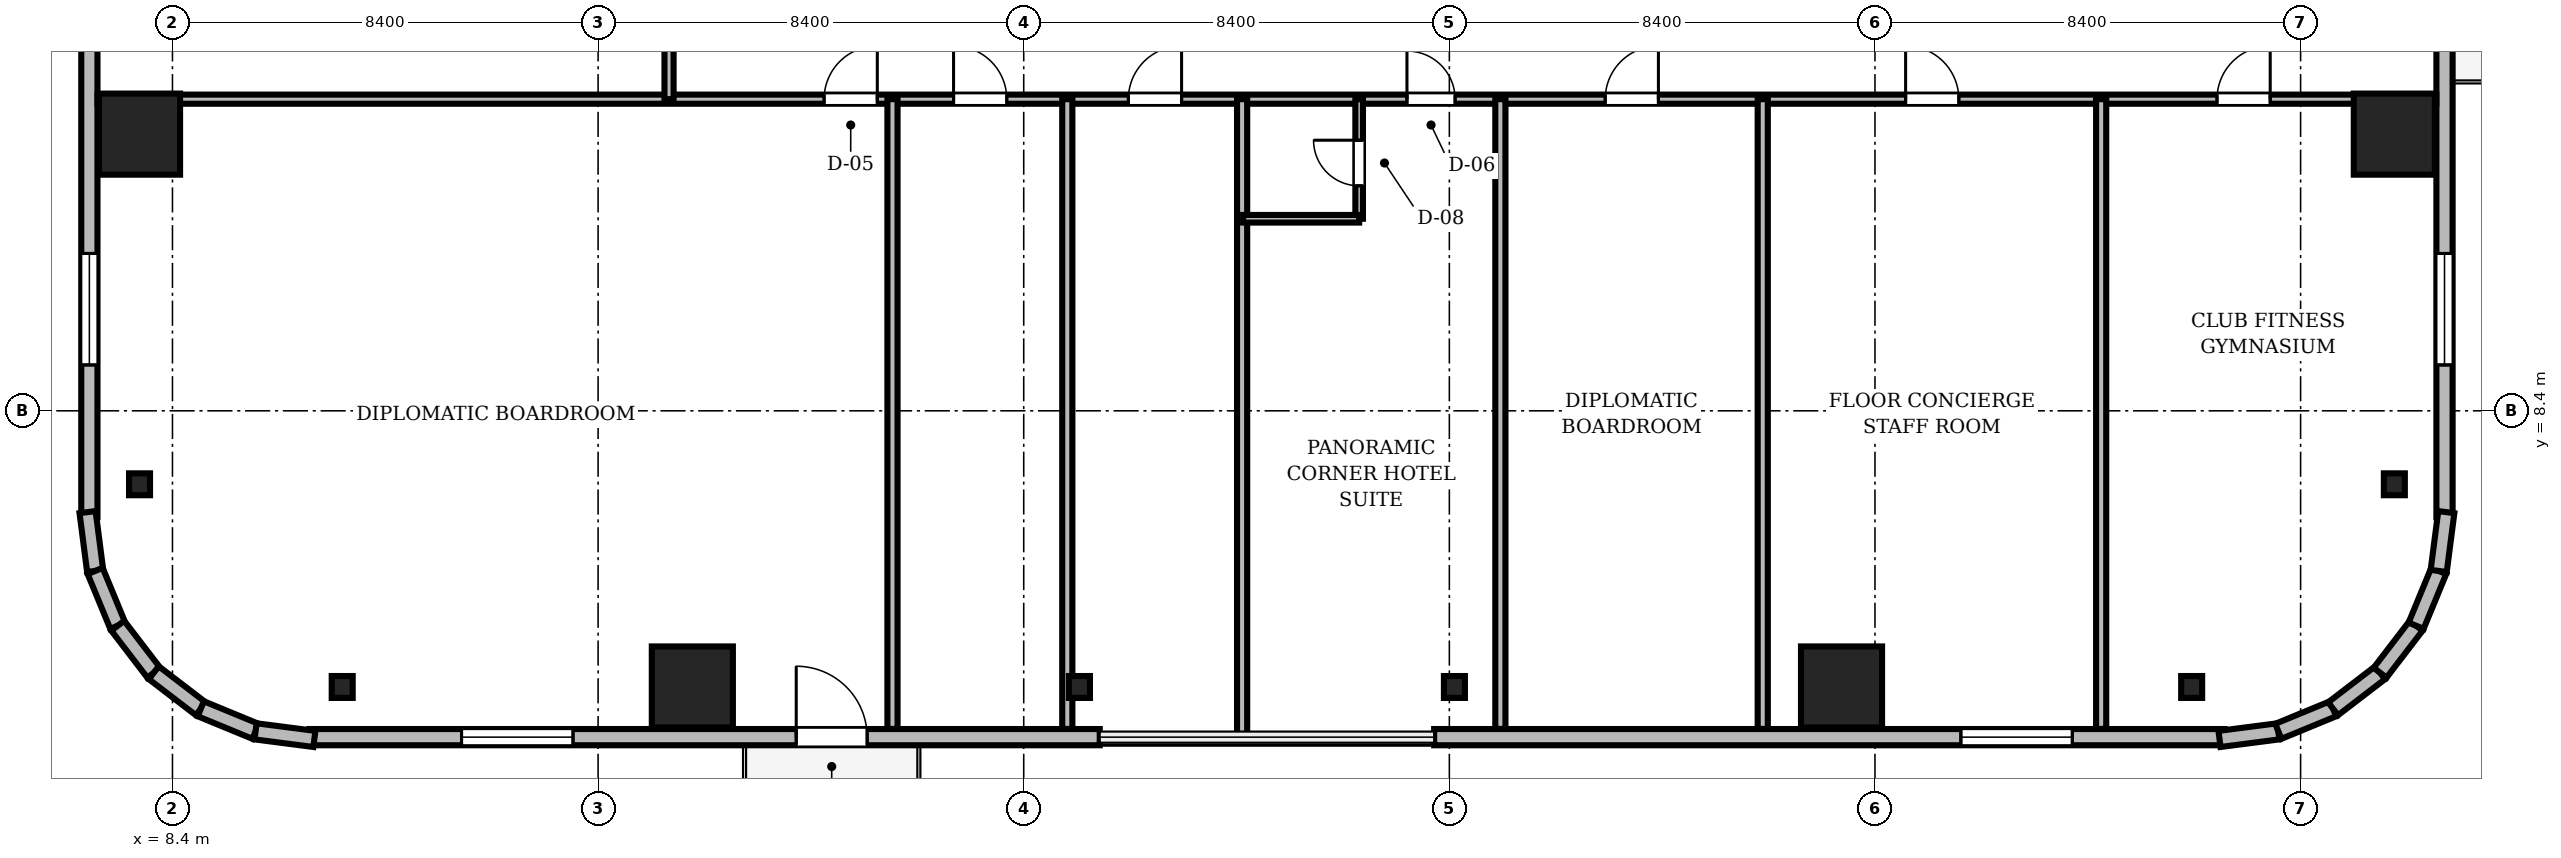
"""IFC4 building model, lengths in metres.
Left out: names, types, materials, properties, quantities, classifications, styles, units other than length and angle.
Written with IfcOpenShell. Run it as: python <this file> out.ifc"""

import sys

from ifc_helpers import new_model, si_unit, direction, frame, frame_2d, origin, origin_2d, place, context, subcontext, project, spatial, rectangle, i_section, extrude, source, transform, mapped, element, fill, save


model = new_model("IFC4")
c1 = context("Model", 3, precision=1e-05, world=origin(), true_north=direction((0.0, 1.0)))
c2 = subcontext(c1, "Body", "Model", "MODEL_VIEW")
j1 = project(units=[si_unit("LENGTHUNIT", "METRE"), si_unit("PLANEANGLEUNIT", "RADIAN")], contexts=[c1])
p1 = place(None, origin())
s1 = spatial("IfcSite", under=j1, at=p1, CompositionType="ELEMENT")
p2 = place(p1, origin())
s2 = spatial("IfcBuilding", under=s1, at=p2, CompositionType="ELEMENT")
p3 = place(p2, frame((0.0, 0.0, 107.5)))
s3 = spatial("IfcBuildingStorey", under=s2, at=p3, CompositionType="ELEMENT", Elevation=107.5)
m1 = source(origin(), c2, "Body", "SweptSolid", [
    extrude(rectangle(XDim=1.6, YDim=1.6, at=origin_2d()), origin(), (0.0, 0.0, 1.0), 3.56),
])
for number, where, z_axis, x_axis in (
    (1, (18.66, 2.95, 0.0), (0.0, 0.0, 1.0), (1.0, 0.0, 0.0)),
    (2, (41.34, 2.95, 0.0), (0.0, 0.0, 1.0), (1.0, 0.0, 0.0)),
    (3, (52.25, 13.86, 0.0), (0.0, 0.0, 1.0), (1.0, 0.0, 0.0)),
    (4, (7.75, 13.86, 0.0), (0.0, 0.0, 1.0), (1.0, 0.0, 0.0)),
):
    element("IfcColumn", number, at=place(p3, frame(where, z_axis=z_axis, x_axis=x_axis)), inside=s3, PredefinedType="COLUMN", context=c2, shape_type="MappedRepresentation", body=[
        mapped(m1, transform((0.0, 0.0, 0.0), scale=1.0)),
    ])
m2 = source(origin(), c2, "Body", "SweptSolid", [
    extrude(i_section(OverallWidth=0.414, OverallDepth=0.432, WebThickness=0.026, FlangeThickness=0.04, FilletRadius=0.015, at=origin_2d()), origin(), (0.0, 0.0, 1.0), 3.56),
])
for number, where, z_axis, x_axis in (
    (5, (11.75, 2.95, 0.0), (0.0, 0.0, 1.0), (1.0, 0.0, 0.0)),
    (6, (26.3, 2.95, 0.0), (0.0, 0.0, 1.0), (1.0, 0.0, 0.0)),
    (7, (33.7, 2.95, 0.0), (0.0, 0.0, 1.0), (1.0, 0.0, 0.0)),
    (8, (48.25, 2.95, 0.0), (0.0, 0.0, 1.0), (1.0, 0.0, 0.0)),
    (9, (52.25, 6.95, 0.0), (0.0, 0.0, 1.0), (1.0, 0.0, 0.0)),
    (10, (7.75, 6.95, 0.0), (0.0, 0.0, 1.0), (1.0, 0.0, 0.0)),
):
    element("IfcColumn", number, at=place(p3, frame(where, z_axis=z_axis, x_axis=x_axis)), inside=s3, PredefinedType="COLUMN", context=c2, shape_type="MappedRepresentation", body=[
        mapped(m2, transform((0.0, 0.0, 0.0), scale=1.0)),
    ])
m3 = source(origin(), c2, "Body", "SweptSolid", [
    extrude(rectangle(XDim=15.6, YDim=0.32, at=frame_2d((7.8, 0.0))), origin(), (0.0, 0.0, 1.0), 3.56),
])
p4 = place(p3, frame((11.1, 1.96, 0.0), z_axis=(0.0, 0.0, 1.0), x_axis=(1.0, 0.0, 0.0)))
e11 = element("IfcWall", 11, at=p4, inside=s3, PredefinedType="SOLIDWALL", context=c2, shape_type="MappedRepresentation", body=[
    mapped(m3, transform((0.0, 0.0, 0.0), scale=1.0)),
])
m4 = source(origin(), c2, "Body", "SweptSolid", [
    extrude(rectangle(XDim=1.4, YDim=2.3, at=frame_2d((0.7, 1.15))), frame((0.0, 0.17, 0.0), z_axis=(0.0, -1.0, 0.0), x_axis=(1.0, 0.0, 0.0)), (0.0, 0.0, 1.0), 0.34),
])
p5 = place(p4, frame((9.61, 0.0, 0.0)))
e12 = element("IfcOpeningElement", 12, at=p5, cuts=e11, PredefinedType="OPENING", context=c2, shape_type="MappedRepresentation", body=[
    mapped(m4, transform((0.0, 0.0, 0.0), scale=1.0)),
])
m5 = source(origin(), c2, "Body", "SweptSolid", [
    extrude(rectangle(XDim=2.2, YDim=2.4, at=frame_2d((1.1, 1.2))), frame((0.0, 0.17, 0.0), z_axis=(0.0, -1.0, 0.0), x_axis=(1.0, 0.0, 0.0)), (0.0, 0.0, 1.0), 0.34),
])
p6 = place(p4, frame((3.005, 0.0, 0.72)))
e13 = element("IfcOpeningElement", 13, at=p6, cuts=e11, PredefinedType="OPENING", context=c2, shape_type="MappedRepresentation", body=[
    mapped(m5, transform((0.0, 0.0, 0.0), scale=1.0)),
])
p7 = place(p3, frame((33.3, 1.96, 0.0), z_axis=(0.0, 0.0, 1.0), x_axis=(1.0, 0.0, 0.0)))
e14 = element("IfcWall", 14, at=p7, inside=s3, PredefinedType="SOLIDWALL", context=c2, shape_type="MappedRepresentation", body=[
    mapped(m3, transform((0.0, 0.0, 0.0), scale=1.0)),
])
p8 = place(p7, frame((10.395, 0.0, 0.72)))
e15 = element("IfcOpeningElement", 15, at=p8, cuts=e14, PredefinedType="OPENING", context=c2, shape_type="MappedRepresentation", body=[
    mapped(m5, transform((0.0, 0.0, 0.0), scale=1.0)),
])
p9 = place(p3, frame((6.76, 21.9, 0.0), z_axis=(0.0, 0.0, 1.0), x_axis=(0.0, -1.0, 0.0)))
e16 = element("IfcWall", 16, at=p9, inside=s3, PredefinedType="SOLIDWALL", context=c2, shape_type="MappedRepresentation", body=[
    mapped(m3, transform((0.0, 0.0, 0.0), scale=1.0)),
])
p10 = place(p9, frame((10.395, 0.0, 0.72)))
e17 = element("IfcOpeningElement", 17, at=p10, cuts=e16, PredefinedType="OPENING", context=c2, shape_type="MappedRepresentation", body=[
    mapped(m5, transform((0.0, 0.0, 0.0), scale=1.0)),
])
p11 = place(p3, frame((53.24, 6.3, 0.0), z_axis=(0.0, 0.0, 1.0), x_axis=(0.0, 1.0, 0.0)))
e18 = element("IfcWall", 18, at=p11, inside=s3, PredefinedType="SOLIDWALL", context=c2, shape_type="MappedRepresentation", body=[
    mapped(m3, transform((0.0, 0.0, 0.0), scale=1.0)),
])
p12 = place(p11, frame((9.61, 0.0, 0.0)))
e19 = element("IfcOpeningElement", 19, at=p12, cuts=e18, PredefinedType="OPENING", context=c2, shape_type="MappedRepresentation", body=[
    mapped(m4, transform((0.0, 0.0, 0.0), scale=1.0)),
])
p13 = place(p11, frame((3.005, 0.0, 0.72)))
e20 = element("IfcOpeningElement", 20, at=p13, cuts=e18, PredefinedType="OPENING", context=c2, shape_type="MappedRepresentation", body=[
    mapped(m5, transform((0.0, 0.0, 0.0), scale=1.0)),
])
m6 = source(origin(), c2, "Body", "SweptSolid", [
    extrude(rectangle(XDim=1.171, YDim=0.32, at=frame_2d((0.585, 0.0))), origin(), (0.0, 0.0, 1.0), 3.56),
])
p14 = place(p3, frame((6.724, 6.401, 0.0), z_axis=(0.0, 0.0, 1.0), x_axis=(0.128269133229, -0.991739395941, 0.0)))
e21 = element("IfcWall", 21, at=p14, inside=s3, PredefinedType="SOLIDWALL", context=c2, shape_type="MappedRepresentation", body=[
    mapped(m6, transform((0.0, 0.0, 0.0), scale=1.0)),
])
m7 = source(origin(), c2, "Body", "SweptSolid", [
    extrude(rectangle(XDim=1.169, YDim=0.32, at=frame_2d((0.584, 0.0))), origin(), (0.0, 0.0, 1.0), 3.56),
])
for number, where, z_axis, x_axis in (
    (22, (6.875, 5.24, 0.0), (0.0, 0.0, 1.0), (0.381, -0.925, 0.0)),
    (23, (7.32, 4.159, 0.0), (0.0, 0.0, 1.0), (0.608, -0.794, 0.0)),
):
    element("IfcWall", number, at=place(p3, frame(where, z_axis=z_axis, x_axis=x_axis)), inside=s3, PredefinedType="SOLIDWALL", context=c2, shape_type="MappedRepresentation", body=[
        mapped(m7, transform((0.0, 0.0, 0.0), scale=1.0)),
    ])
m8 = source(origin(), c2, "Body", "SweptSolid", [
    extrude(rectangle(XDim=1.169, YDim=0.32, at=frame_2d((0.584, 0.0))), origin(), (0.0, 0.0, 1.0), 3.56),
])
p15 = place(p3, frame((8.031, 3.231, 0.0), z_axis=(0.0, 0.0, 1.0), x_axis=(0.793663520347, -0.608356981114, 0.0)))
e24 = element("IfcWall", 24, at=p15, inside=s3, PredefinedType="SOLIDWALL", context=c2, shape_type="MappedRepresentation", body=[
    mapped(m8, transform((0.0, 0.0, 0.0), scale=1.0)),
])
m9 = source(origin(), c2, "Body", "SweptSolid", [
    extrude(rectangle(XDim=1.169, YDim=0.32, at=frame_2d((0.585, 0.0))), origin(), (0.0, 0.0, 1.0), 3.56),
])
p16 = place(p3, frame((8.959, 2.52, 0.0), z_axis=(0.0, 0.0, 1.0), x_axis=(0.924479075121, -0.381232789334, 0.0)))
e25 = element("IfcWall", 25, at=p16, inside=s3, PredefinedType="SOLIDWALL", context=c2, shape_type="MappedRepresentation", body=[
    mapped(m9, transform((0.0, 0.0, 0.0), scale=1.0)),
])
m10 = source(origin(), c2, "Body", "SweptSolid", [
    extrude(rectangle(XDim=1.17, YDim=0.32, at=frame_2d((0.585, 0.0))), origin(), (0.0, 0.0, 1.0), 3.56),
])
for number, where, z_axis, x_axis in (
    (26, (10.04, 2.074, 0.0), (0.0, 0.0, 1.0), (0.992, -0.128, 0.0)),
    (27, (48.8, 1.925, 0.0), (0.0, 0.0, 1.0), (0.992, 0.128, 0.0)),
):
    element("IfcWall", number, at=place(p3, frame(where, z_axis=z_axis, x_axis=x_axis)), inside=s3, PredefinedType="SOLIDWALL", context=c2, shape_type="MappedRepresentation", body=[
        mapped(m10, transform((0.0, 0.0, 0.0), scale=1.0)),
    ])
p17 = place(p3, frame((49.96, 2.074, 0.0), z_axis=(0.0, 0.0, 1.0), x_axis=(0.924479075121, 0.381232789334, 0.0)))
e28 = element("IfcWall", 28, at=p17, inside=s3, PredefinedType="SOLIDWALL", context=c2, shape_type="MappedRepresentation", body=[
    mapped(m9, transform((0.0, 0.0, 0.0), scale=1.0)),
])
p18 = place(p3, frame((51.041, 2.52, 0.0), z_axis=(0.0, 0.0, 1.0), x_axis=(0.793663520347, 0.608356981114, 0.0)))
e29 = element("IfcWall", 29, at=p18, inside=s3, PredefinedType="SOLIDWALL", context=c2, shape_type="MappedRepresentation", body=[
    mapped(m8, transform((0.0, 0.0, 0.0), scale=1.0)),
])
for number, where, z_axis, x_axis in (
    (30, (51.969, 3.231, 0.0), (0.0, 0.0, 1.0), (0.608, 0.794, 0.0)),
    (31, (52.68, 4.159, 0.0), (0.0, 0.0, 1.0), (0.381, 0.925, 0.0)),
):
    element("IfcWall", number, at=place(p3, frame(where, z_axis=z_axis, x_axis=x_axis)), inside=s3, PredefinedType="SOLIDWALL", context=c2, shape_type="MappedRepresentation", body=[
        mapped(m7, transform((0.0, 0.0, 0.0), scale=1.0)),
    ])
p19 = place(p3, frame((53.125, 5.24, 0.0), z_axis=(0.0, 0.0, 1.0), x_axis=(0.128269133229, 0.991739395941, 0.0)))
e32 = element("IfcWall", 32, at=p19, inside=s3, PredefinedType="SOLIDWALL", context=c2, shape_type="MappedRepresentation", body=[
    mapped(m6, transform((0.0, 0.0, 0.0), scale=1.0)),
])
m11 = source(origin(), c2, "Body", "SweptSolid", [
    extrude(rectangle(XDim=46.156, YDim=0.18, at=frame_2d((23.078, 0.0))), origin(), (0.0, 0.0, 1.0), 2.802),
])
p20 = place(p3, frame((6.922, 14.55, 0.0), z_axis=(0.0, 0.0, 1.0), x_axis=(1.0, 0.0, 0.0)))
e33 = element("IfcWall", 33, at=p20, inside=s3, PredefinedType="PARTITIONING", context=c2, shape_type="MappedRepresentation", body=[
    mapped(m11, transform((0.0, 0.0, 0.0), scale=1.0)),
])
m12 = source(origin(), c2, "Body", "SweptSolid", [
    extrude(rectangle(XDim=1.05, YDim=2.2, at=frame_2d((0.525, 1.1))), frame((0.0, 0.1, 0.0), z_axis=(0.0, -1.0, 0.0), x_axis=(1.0, 0.0, 0.0)), (0.0, 0.0, 1.0), 0.2),
])
p21 = place(p20, frame((14.338, 0.0, 0.0)))
e34 = element("IfcOpeningElement", 34, at=p21, cuts=e33, PredefinedType="OPENING", context=c2, shape_type="MappedRepresentation", body=[
    mapped(m12, transform((0.0, 0.0, 0.0), scale=1.0)),
])
p22 = place(p20, frame((16.893, 0.0, 0.0)))
e35 = element("IfcOpeningElement", 35, at=p22, cuts=e33, PredefinedType="OPENING", context=c2, shape_type="MappedRepresentation", body=[
    mapped(m12, transform((0.0, 0.0, 0.0), scale=1.0)),
])
p23 = place(p20, frame((20.344, 0.0, 0.0)))
e36 = element("IfcOpeningElement", 36, at=p23, cuts=e33, PredefinedType="OPENING", context=c2, shape_type="MappedRepresentation", body=[
    mapped(m12, transform((0.0, 0.0, 0.0), scale=1.0)),
])
m13 = source(origin(), c2, "Body", "SweptSolid", [
    extrude(rectangle(XDim=0.95, YDim=2.15, at=frame_2d((0.475, 1.075))), frame((0.0, 0.1, 0.0), z_axis=(0.0, -1.0, 0.0), x_axis=(1.0, 0.0, 0.0)), (0.0, 0.0, 1.0), 0.2),
])
p24 = place(p20, frame((25.842, 0.0, 0.0)))
e37 = element("IfcOpeningElement", 37, at=p24, cuts=e33, PredefinedType="OPENING", context=c2, shape_type="MappedRepresentation", body=[
    mapped(m13, transform((0.0, 0.0, 0.0), scale=1.0)),
])
p25 = place(p20, frame((29.754, 0.0, 0.0)))
e38 = element("IfcOpeningElement", 38, at=p25, cuts=e33, PredefinedType="OPENING", context=c2, shape_type="MappedRepresentation", body=[
    mapped(m12, transform((0.0, 0.0, 0.0), scale=1.0)),
])
p26 = place(p20, frame((35.683, 0.0, 0.0)))
e39 = element("IfcOpeningElement", 39, at=p26, cuts=e33, PredefinedType="OPENING", context=c2, shape_type="MappedRepresentation", body=[
    mapped(m12, transform((0.0, 0.0, 0.0), scale=1.0)),
])
p27 = place(p20, frame((41.828, 0.0, 0.0)))
e40 = element("IfcOpeningElement", 40, at=p27, cuts=e33, PredefinedType="OPENING", context=c2, shape_type="MappedRepresentation", body=[
    mapped(m12, transform((0.0, 0.0, 0.0), scale=1.0)),
])
m14 = source(origin(), c2, "Body", "SweptSolid", [
    extrude(rectangle(XDim=2.36, YDim=0.15, at=frame_2d((1.18, 0.0))), origin(), (0.0, 0.0, 1.0), 3.56),
])
p28 = place(p3, frame((31.82, 12.19, 0.0), z_axis=(0.0, 0.0, 1.0), x_axis=(0.0, 1.0, 0.0)))
e41 = element("IfcWall", 41, at=p28, inside=s3, PredefinedType="PARTITIONING", context=c2, shape_type="MappedRepresentation", body=[
    mapped(m14, transform((0.0, 0.0, 0.0), scale=1.0)),
])
m15 = source(origin(), c2, "Body", "SweptSolid", [
    extrude(rectangle(XDim=0.9, YDim=2.1, at=frame_2d((0.45, 1.05))), frame((0.0, 0.085, 0.0), z_axis=(0.0, -1.0, 0.0), x_axis=(1.0, 0.0, 0.0)), (0.0, 0.0, 1.0), 0.17),
])
p29 = place(p28, frame((0.65, 0.0, 0.0)))
e42 = element("IfcOpeningElement", 42, at=p29, cuts=e41, PredefinedType="OPENING", context=c2, shape_type="MappedRepresentation", body=[
    mapped(m15, transform((0.0, 0.0, 0.0), scale=1.0)),
])
m16 = source(origin(), c2, "Body", "SweptSolid", [
    extrude(rectangle(XDim=14.0, YDim=0.18, at=frame_2d((7.0, 0.0))), origin(), (0.0, 0.0, 1.0), 2.952),
])
p30 = place(p3, frame((18.2, 14.55, 0.0), z_axis=(0.0, 0.0, 1.0), x_axis=(0.0, 1.0, 0.0)))
e43 = element("IfcWall", 43, at=p30, inside=s3, PredefinedType="PARTITIONING", context=c2, shape_type="MappedRepresentation", body=[
    mapped(m16, transform((0.0, 0.0, 0.0), scale=1.0)),
])
m17 = source(origin(), c2, "Body", "SweptSolid", [
    extrude(rectangle(XDim=12.428, YDim=0.2, at=frame_2d((6.214, 0.0))), origin(), (0.0, 0.0, 1.0), 2.802),
])
for number, where, z_axis, x_axis in (
    (44, (22.61, 2.122, 0.0), (0.0, 0.0, 1.0), (0.0, 1.0, 0.0)),
    (45, (26.06, 2.122, 0.0), (0.0, 0.0, 1.0), (0.0, 1.0, 0.0)),
):
    element("IfcWall", number, at=place(p3, frame(where, z_axis=z_axis, x_axis=x_axis)), inside=s3, PredefinedType="PARTITIONING", context=c2, shape_type="MappedRepresentation", body=[
        mapped(m17, transform((0.0, 0.0, 0.0), scale=1.0)),
    ])
m18 = source(origin(), c2, "Body", "SweptSolid", [
    extrude(rectangle(XDim=12.62, YDim=0.2, at=frame_2d((6.31, 0.0))), origin(), (0.0, 0.0, 1.0), 2.802),
])
p31 = place(p3, frame((29.51, 1.93, 0.0), z_axis=(0.0, 0.0, 1.0), x_axis=(0.0, 1.0, 0.0)))
e46 = element("IfcWall", 46, at=p31, inside=s3, PredefinedType="PARTITIONING", context=c2, shape_type="MappedRepresentation", body=[
    mapped(m18, transform((0.0, 0.0, 0.0), scale=1.0)),
])
for number, where, z_axis, x_axis in (
    (47, (34.607, 2.122, 0.0), (0.0, 0.0, 1.0), (0.0, 1.0, 0.0)),
    (48, (39.785, 2.122, 0.0), (0.0, 0.0, 1.0), (0.0, 1.0, 0.0)),
    (49, (46.464, 2.122, 0.0), (0.0, 0.0, 1.0), (0.0, 1.0, 0.0)),
):
    element("IfcWall", number, at=place(p3, frame(where, z_axis=z_axis, x_axis=x_axis)), inside=s3, PredefinedType="PARTITIONING", context=c2, shape_type="MappedRepresentation", body=[
        mapped(m17, transform((0.0, 0.0, 0.0), scale=1.0)),
    ])
m19 = source(origin(), c2, "Body", "SweptSolid", [
    extrude(rectangle(XDim=2.29, YDim=0.15, at=frame_2d((1.145, 0.0))), origin(), (0.0, 0.0, 1.0), 2.952),
])
p32 = place(p3, frame((29.53, 12.19, 0.0), z_axis=(0.0, 0.0, 1.0), x_axis=(1.0, 0.0, 0.0)))
e50 = element("IfcWall", 50, at=p32, inside=s3, PredefinedType="PARTITIONING", context=c2, shape_type="MappedRepresentation", body=[
    mapped(m19, transform((0.0, 0.0, 0.0), scale=1.0)),
])
m20 = source(origin(), c2, "Body", "SweptSolid", [
    extrude(rectangle(XDim=1.4, YDim=2.3, at=frame_2d((0.7, 1.15))), frame((0.0, 0.025, 0.0), z_axis=(0.0, -1.0, 0.0), x_axis=(1.0, 0.0, 0.0)), (0.0, 0.0, 1.0), 0.05),
])
p33 = place(p5, frame((1.4, 0.0, 0.0), z_axis=(0.0, 0.0, 1.0), x_axis=(-1.0, 0.0, 0.0)))
e51 = element("IfcDoor", 51, at=p33, inside=s3, OperationType="DOUBLE_DOOR_SLIDING", PredefinedType="DOOR", context=c2, shape_type="MappedRepresentation", body=[
    mapped(m20, transform((0.0, 0.0, 0.0), scale=1.0)),
])
fill(e12, e51)
m21 = source(origin(), c2, "Body", "SweptSolid", [
    extrude(rectangle(XDim=2.2, YDim=2.4, at=frame_2d((1.1, 1.2))), frame((0.0, 0.03, 0.0), z_axis=(0.0, -1.0, 0.0), x_axis=(1.0, 0.0, 0.0)), (0.0, 0.0, 1.0), 0.06),
])
p34 = place(p6, origin())
e52 = element("IfcWindow", 52, at=p34, inside=s3, PartitioningType="SINGLE_PANEL", PredefinedType="WINDOW", context=c2, shape_type="MappedRepresentation", body=[
    mapped(m21, transform((0.0, 0.0, 0.0), scale=1.0)),
])
fill(e13, e52)
p35 = place(p8, origin())
e53 = element("IfcWindow", 53, at=p35, inside=s3, PartitioningType="SINGLE_PANEL", PredefinedType="WINDOW", context=c2, shape_type="MappedRepresentation", body=[
    mapped(m21, transform((0.0, 0.0, 0.0), scale=1.0)),
])
fill(e15, e53)
p36 = place(p10, origin())
e54 = element("IfcWindow", 54, at=p36, inside=s3, PartitioningType="SINGLE_PANEL", PredefinedType="WINDOW", context=c2, shape_type="MappedRepresentation", body=[
    mapped(m21, transform((0.0, 0.0, 0.0), scale=1.0)),
])
fill(e17, e54)
p37 = place(p13, origin())
e55 = element("IfcWindow", 55, at=p37, inside=s3, PartitioningType="SINGLE_PANEL", PredefinedType="WINDOW", context=c2, shape_type="MappedRepresentation", body=[
    mapped(m21, transform((0.0, 0.0, 0.0), scale=1.0)),
])
fill(e20, e55)
m22 = source(origin(), c2, "Body", "SweptSolid", [
    extrude(rectangle(XDim=1.05, YDim=2.2, at=frame_2d((0.525, 1.1))), frame((0.0, 0.025, 0.0), z_axis=(0.0, -1.0, 0.0), x_axis=(1.0, 0.0, 0.0)), (0.0, 0.0, 1.0), 0.05),
])
p38 = place(p21, origin())
e56 = element("IfcDoor", 56, at=p38, inside=s3, OperationType="SINGLE_SWING_RIGHT", PredefinedType="DOOR", context=c2, shape_type="MappedRepresentation", body=[
    mapped(m22, transform((0.0, 0.0, 0.0), scale=1.0)),
])
fill(e34, e56)
p39 = place(p22, origin())
e57 = element("IfcDoor", 57, at=p39, inside=s3, OperationType="SINGLE_SWING_LEFT", PredefinedType="DOOR", context=c2, shape_type="MappedRepresentation", body=[
    mapped(m22, transform((0.0, 0.0, 0.0), scale=1.0)),
])
fill(e35, e57)
p40 = place(p23, origin())
e58 = element("IfcDoor", 58, at=p40, inside=s3, OperationType="SINGLE_SWING_RIGHT", PredefinedType="DOOR", context=c2, shape_type="MappedRepresentation", body=[
    mapped(m22, transform((0.0, 0.0, 0.0), scale=1.0)),
])
fill(e36, e58)
m23 = source(origin(), c2, "Body", "SweptSolid", [
    extrude(rectangle(XDim=0.95, YDim=2.15, at=frame_2d((0.475, 1.075))), frame((0.0, 0.025, 0.0), z_axis=(0.0, -1.0, 0.0), x_axis=(1.0, 0.0, 0.0)), (0.0, 0.0, 1.0), 0.05),
])
p41 = place(p24, origin())
e59 = element("IfcDoor", 59, at=p41, inside=s3, OperationType="SINGLE_SWING_LEFT", PredefinedType="DOOR", context=c2, shape_type="MappedRepresentation", body=[
    mapped(m23, transform((0.0, 0.0, 0.0), scale=1.0)),
])
fill(e37, e59)
p42 = place(p25, origin())
e60 = element("IfcDoor", 60, at=p42, inside=s3, OperationType="SINGLE_SWING_RIGHT", PredefinedType="DOOR", context=c2, shape_type="MappedRepresentation", body=[
    mapped(m22, transform((0.0, 0.0, 0.0), scale=1.0)),
])
fill(e38, e60)
p43 = place(p26, origin())
e61 = element("IfcDoor", 61, at=p43, inside=s3, OperationType="SINGLE_SWING_LEFT", PredefinedType="DOOR", context=c2, shape_type="MappedRepresentation", body=[
    mapped(m22, transform((0.0, 0.0, 0.0), scale=1.0)),
])
fill(e39, e61)
p44 = place(p27, origin())
e62 = element("IfcDoor", 62, at=p44, inside=s3, OperationType="SINGLE_SWING_RIGHT", PredefinedType="DOOR", context=c2, shape_type="MappedRepresentation", body=[
    mapped(m22, transform((0.0, 0.0, 0.0), scale=1.0)),
])
fill(e40, e62)
m24 = source(origin(), c2, "Body", "SweptSolid", [
    extrude(rectangle(XDim=0.9, YDim=2.1, at=frame_2d((0.45, 1.05))), frame((0.0, 0.025, 0.0), z_axis=(0.0, -1.0, 0.0), x_axis=(1.0, 0.0, 0.0)), (0.0, 0.0, 1.0), 0.05),
])
p45 = place(p29, origin())
e63 = element("IfcDoor", 63, at=p45, inside=s3, OperationType="SINGLE_SWING_RIGHT", PredefinedType="DOOR", context=c2, shape_type="MappedRepresentation", body=[
    mapped(m24, transform((0.0, 0.0, 0.0), scale=1.0)),
])
fill(e42, e63)
save(model, sys.argv[1])
